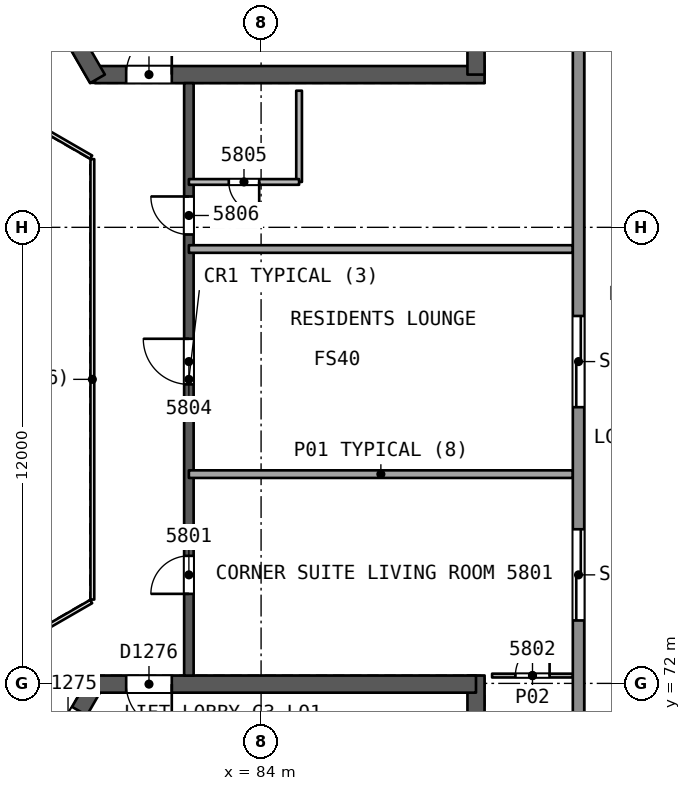
"""IFC4 building model, lengths in metres.
Left out: names, types, materials, properties, quantities, classifications, styles, units other than length and angle.
Written with IfcOpenShell. Run it as: python <this file> out.ifc"""

import sys

from ifc_helpers import new_model, si_unit, direction, frame, frame_2d, origin, place, context, subcontext, project, spatial, rectangle, extrude, element, fill, save


model = new_model("IFC4")
c1 = context("Model", 3, precision=1e-05, world=origin(), true_north=direction((0.0, 1.0)))
c2 = subcontext(c1, "Body", "Model", "MODEL_VIEW")
j1 = project(units=[si_unit("LENGTHUNIT", "METRE"), si_unit("PLANEANGLEUNIT", "RADIAN")], contexts=[c1])
p1 = place(None, origin())
s1 = spatial("IfcSite", under=j1, at=p1, CompositionType="ELEMENT")
p2 = place(p1, origin())
s2 = spatial("IfcBuilding", under=s1, at=p2, CompositionType="ELEMENT")
p3 = place(p2, frame((0.0, 0.0, 235.4)))
s3 = spatial("IfcBuildingStorey", under=s2, at=p3, CompositionType="ELEMENT", Elevation=235.4)
p4 = place(p3, frame((79.63, 88.019, 0.0), z_axis=(0.0, 0.0, 1.0), x_axis=(1.0, 0.0, 0.0)))
e1 = element("IfcWall", 1, at=p4, inside=s3, PredefinedType="SHEAR", context=c2, shape_type="SweptSolid", body=[
    extrude(rectangle(XDim=10.25, YDim=0.45, at=frame_2d((5.125, 0.0))), origin(), (0.0, 0.0, 1.0), 3.7),
])
p5 = place(p4, frame((0.82, 0.0, 0.0)))
e2 = element("IfcOpeningElement", 2, at=p5, cuts=e1, PredefinedType="OPENING", context=c2, shape_type="SweptSolid", body=[
    extrude(rectangle(XDim=1.2, YDim=2.1, at=frame_2d((0.6, 1.05))), frame((0.0, 0.235, 0.0), z_axis=(0.0, -1.0, 0.0), x_axis=(1.0, 0.0, 0.0)), (0.0, 0.0, 1.0), 0.471),
])
p6 = place(p3, frame((89.655, 88.019, 0.0), z_axis=(0.0, 0.0, 1.0), x_axis=(0.0, 1.0, 0.0)))
e3 = element("IfcWall", 3, at=p6, inside=s3, PredefinedType="SHEAR", context=c2, shape_type="SweptSolid", body=[
    extrude(rectangle(XDim=14.108, YDim=0.45, at=frame_2d((7.054, 0.0))), origin(), (0.0, 0.0, 1.0), 3.7),
])
p7 = place(p3, frame((74.617, 96.701, 0.0), z_axis=(0.0, 0.0, 1.0), x_axis=(0.499994385119, -0.866028645513, 0.0)))
e4 = element("IfcWall", 4, at=p7, inside=s3, PredefinedType="SHEAR", context=c2, shape_type="SweptSolid", body=[
    extrude(rectangle(XDim=10.155, YDim=0.45, at=frame_2d((5.077, 0.0))), origin(), (0.0, 0.0, 1.0), 3.7),
])
p8 = place(p7, frame((8.005, 0.0, 0.0)))
e5 = element("IfcOpeningElement", 5, at=p8, cuts=e4, PredefinedType="OPENING", context=c2, shape_type="SweptSolid", body=[
    extrude(rectangle(XDim=1.2, YDim=2.1, at=frame_2d((0.6, 1.05))), frame((0.0, 0.235, 0.0), z_axis=(0.0, -1.0, 0.0), x_axis=(1.0, 0.0, 0.0)), (0.0, 0.0, 1.0), 0.471),
])
p9 = place(p3, frame((79.63, 71.981, 0.0), z_axis=(0.0, 0.0, 1.0), x_axis=(-0.500002171595, -0.86602415001, 0.0)))
e6 = element("IfcWall", 6, at=p9, inside=s3, PredefinedType="SHEAR", context=c2, shape_type="SweptSolid", body=[
    extrude(rectangle(XDim=10.25, YDim=0.45, at=frame_2d((5.125, 0.0))), origin(), (0.0, 0.0, 1.0), 3.7),
])
p10 = place(p9, frame((0.82, 0.0, 0.0)))
e7 = element("IfcOpeningElement", 7, at=p10, cuts=e6, PredefinedType="OPENING", context=c2, shape_type="SweptSolid", body=[
    extrude(rectangle(XDim=1.2, YDim=2.1, at=frame_2d((0.6, 1.05))), frame((0.0, 0.235, 0.0), z_axis=(0.0, -1.0, 0.0), x_axis=(1.0, 0.0, 0.0)), (0.0, 0.0, 1.0), 0.471),
])
p11 = place(p3, frame((89.655, 58.002, 0.0), z_axis=(0.0, 0.0, 1.0), x_axis=(0.0, 1.0, 0.0)))
e8 = element("IfcWall", 8, at=p11, inside=s3, PredefinedType="SHEAR", context=c2, shape_type="SweptSolid", body=[
    extrude(rectangle(XDim=14.204, YDim=0.45, at=frame_2d((7.102, 0.0))), origin(), (0.0, 0.0, 1.0), 3.7),
])
p12 = place(p3, frame((89.655, 71.981, 0.0), z_axis=(0.0, 0.0, 1.0), x_axis=(-1.0, 0.0, 0.0)))
e9 = element("IfcWall", 9, at=p12, inside=s3, PredefinedType="SHEAR", context=c2, shape_type="SweptSolid", body=[
    extrude(rectangle(XDim=10.155, YDim=0.45, at=frame_2d((5.078, 0.0))), origin(), (0.0, 0.0, 1.0), 3.7),
])
p13 = place(p12, frame((8.005, 0.0, 0.0)))
e10 = element("IfcOpeningElement", 10, at=p13, cuts=e9, PredefinedType="OPENING", context=c2, shape_type="SweptSolid", body=[
    extrude(rectangle(XDim=1.2, YDim=2.1, at=frame_2d((0.6, 1.05))), frame((0.0, 0.235, 0.0), z_axis=(0.0, -1.0, 0.0), x_axis=(1.0, 0.0, 0.0)), (0.0, 0.0, 1.0), 0.471),
])
p14 = place(p3, frame((82.1, 72.206, 0.0), z_axis=(0.0, 0.0, 1.0), x_axis=(0.0, 1.0, 0.0)))
e11 = element("IfcWall", 11, at=p14, inside=s3, PredefinedType="SHEAR", context=c2, shape_type="SweptSolid", body=[
    extrude(rectangle(XDim=15.588, YDim=0.25, at=frame_2d((7.794, 0.0))), origin(), (0.0, 0.0, 1.0), 3.3),
])
p15 = place(p14, frame((2.15, 0.0, 0.0)))
e12 = element("IfcOpeningElement", 12, at=p15, cuts=e11, PredefinedType="OPENING", context=c2, shape_type="SweptSolid", body=[
    extrude(rectangle(XDim=1.0, YDim=2.1, at=frame_2d((0.5, 1.05))), frame((0.0, 0.135, 0.0), z_axis=(0.0, -1.0, 0.0), x_axis=(1.0, 0.0, 0.0)), (0.0, 0.0, 1.0), 0.271),
])
p16 = place(p14, frame((7.662, 0.0, 0.0)))
e13 = element("IfcOpeningElement", 13, at=p16, cuts=e11, PredefinedType="OPENING", context=c2, shape_type="SweptSolid", body=[
    extrude(rectangle(XDim=1.2, YDim=2.4, at=frame_2d((0.6, 1.2))), frame((0.0, 0.135, 0.0), z_axis=(0.0, -1.0, 0.0), x_axis=(1.0, 0.0, 0.0)), (0.0, 0.0, 1.0), 0.271),
])
p17 = place(p14, frame((11.606, 0.0, 0.0)))
e14 = element("IfcOpeningElement", 14, at=p17, cuts=e11, PredefinedType="OPENING", context=c2, shape_type="SweptSolid", body=[
    extrude(rectangle(XDim=1.0, YDim=2.1, at=frame_2d((0.5, 1.05))), frame((0.0, 0.135, 0.0), z_axis=(0.0, -1.0, 0.0), x_axis=(1.0, 0.0, 0.0)), (0.0, 0.0, 1.0), 0.271),
])
p18 = place(p3, frame((90.079, 72.206, 0.0), z_axis=(0.0, 0.0, 1.0), x_axis=(1.0, 0.0, 0.0)))
e15 = element("IfcWall", 15, at=p18, inside=s3, PredefinedType="PARTITIONING", context=c2, shape_type="SweptSolid", body=[
    extrude(rectangle(XDim=2.125, YDim=0.1, at=frame_2d((1.062, 0.0))), origin(), (0.0, 0.0, 1.0), 3.3),
])
p19 = place(p18, frame((0.613, 0.0, 0.0)))
e16 = element("IfcOpeningElement", 16, at=p19, cuts=e15, PredefinedType="OPENING", context=c2, shape_type="SweptSolid", body=[
    extrude(rectangle(XDim=0.9, YDim=2.1, at=frame_2d((0.45, 1.05))), frame((0.0, 0.061, 0.0), z_axis=(0.0, -1.0, 0.0), x_axis=(1.0, 0.0, 0.0)), (0.0, 0.0, 1.0), 0.121),
])
for number, where, z_axis, x_axis in (
    (17, (92.204, 77.506, 0.0), (0.0, 0.0, 1.0), (-1.0, 0.0, 0.0)),
    (18, (92.204, 83.429, 0.0), (0.0, 0.0, 1.0), (-1.0, 0.0, 0.0)),
):
    element("IfcWall", number, at=place(p3, frame(where, z_axis=z_axis, x_axis=x_axis)), inside=s3, PredefinedType="PARTITIONING", context=c2, shape_type="SweptSolid", body=[
        extrude(rectangle(XDim=10.104, YDim=0.2, at=frame_2d((5.052, 0.0))), origin(), (0.0, 0.0, 1.0), 3.3),
    ])
p20 = place(p3, frame((85.0, 87.595, 0.0), z_axis=(0.0, 0.0, 1.0), x_axis=(0.0, -1.0, 0.0)))
e19 = element("IfcWall", 19, at=p20, inside=s3, PredefinedType="PARTITIONING", context=c2, shape_type="SweptSolid", body=[
    extrude(rectangle(XDim=2.401, YDim=0.15, at=frame_2d((1.2, 0.0))), origin(), (0.0, 0.0, 1.0), 3.3),
])
p21 = place(p3, frame((85.0, 85.194, 0.0), z_axis=(0.0, 0.0, 1.0), x_axis=(-1.0, 0.0, 0.0)))
e20 = element("IfcWall", 20, at=p21, inside=s3, PredefinedType="PARTITIONING", context=c2, shape_type="SweptSolid", body=[
    extrude(rectangle(XDim=2.9, YDim=0.15, at=frame_2d((1.45, 0.0))), origin(), (0.0, 0.0, 1.0), 3.3),
])
p22 = place(p21, frame((1.05, 0.0, 0.0)))
e21 = element("IfcOpeningElement", 21, at=p22, cuts=e20, PredefinedType="OPENING", context=c2, shape_type="SweptSolid", body=[
    extrude(rectangle(XDim=0.8, YDim=2.1, at=frame_2d((0.4, 1.05))), frame((0.0, 0.085, 0.0), z_axis=(0.0, -1.0, 0.0), x_axis=(1.0, 0.0, 0.0)), (0.0, 0.0, 1.0), 0.171),
])
p23 = place(p3, frame((92.353, 104.952, 0.0), z_axis=(0.0, 0.0, 1.0), x_axis=(0.0, -1.0, 0.0)))
e22 = element("IfcWall", 22, at=p23, inside=s3, PredefinedType="SOLIDWALL", context=c2, shape_type="SweptSolid", body=[
    extrude(rectangle(XDim=49.903, YDim=0.3, at=frame_2d((24.952, 0.0))), origin(), (0.0, 0.0, 1.0), 3.3),
])
p24 = place(p23, frame((28.896, 0.0, 0.0)))
e23 = element("IfcOpeningElement", 23, at=p24, cuts=e22, PredefinedType="OPENING", context=c2, shape_type="SweptSolid", body=[
    extrude(rectangle(XDim=2.4, YDim=2.4, at=frame_2d((1.2, 1.2))), frame((0.0, 0.161, 0.0), z_axis=(0.0, -1.0, 0.0), x_axis=(1.0, 0.0, 0.0)), (0.0, 0.0, 1.0), 0.321),
])
p25 = place(p23, frame((38.836, 0.0, 0.0)))
e24 = element("IfcOpeningElement", 24, at=p25, cuts=e22, PredefinedType="OPENING", context=c2, shape_type="SweptSolid", body=[
    extrude(rectangle(XDim=2.4, YDim=2.4, at=frame_2d((1.2, 1.2))), frame((0.0, 0.161, 0.0), z_axis=(0.0, -1.0, 0.0), x_axis=(1.0, 0.0, 0.0)), (0.0, 0.0, 1.0), 0.321),
])
p26 = place(p23, frame((9.518, 0.0, 0.0)))
e25 = element("IfcOpeningElement", 25, at=p26, cuts=e22, PredefinedType="OPENING", context=c2, shape_type="SweptSolid", body=[
    extrude(rectangle(XDim=2.4, YDim=2.4, at=frame_2d((1.2, 1.2))), frame((0.0, 0.161, 0.0), z_axis=(0.0, -1.0, 0.0), x_axis=(1.0, 0.0, 0.0)), (0.0, 0.0, 1.0), 0.321),
])
p27 = place(p23, frame((23.284, 0.0, 0.0)))
e26 = element("IfcOpeningElement", 26, at=p27, cuts=e22, PredefinedType="OPENING", context=c2, shape_type="SweptSolid", body=[
    extrude(rectangle(XDim=2.4, YDim=2.4, at=frame_2d((1.2, 1.2))), frame((0.0, 0.161, 0.0), z_axis=(0.0, -1.0, 0.0), x_axis=(1.0, 0.0, 0.0)), (0.0, 0.0, 1.0), 0.321),
])
p28 = place(p3, frame((44.715, 82.552, 0.0), z_axis=(0.0, 0.0, 1.0), x_axis=(0.866025334516, 0.500000119977, 0.0)))
e27 = element("IfcWall", 27, at=p28, inside=s3, PredefinedType="SOLIDWALL", context=c2, shape_type="SweptSolid", body=[
    extrude(rectangle(XDim=49.903, YDim=0.3, at=frame_2d((24.952, 0.0))), origin(), (0.0, 0.0, 1.0), 3.3),
])
p29 = place(p28, frame((23.284, 0.0, 0.0)))
e28 = element("IfcOpeningElement", 28, at=p29, cuts=e27, PredefinedType="OPENING", context=c2, shape_type="SweptSolid", body=[
    extrude(rectangle(XDim=2.4, YDim=2.4, at=frame_2d((1.2, 1.2))), frame((0.0, 0.161, 0.0), z_axis=(0.0, -1.0, 0.0), x_axis=(1.0, 0.0, 0.0)), (0.0, 0.0, 1.0), 0.321),
])
p30 = place(p28, frame((37.674, 0.0, 0.0)))
e29 = element("IfcOpeningElement", 29, at=p30, cuts=e27, PredefinedType="OPENING", context=c2, shape_type="SweptSolid", body=[
    extrude(rectangle(XDim=2.4, YDim=2.4, at=frame_2d((1.2, 1.2))), frame((0.0, 0.161, 0.0), z_axis=(0.0, -1.0, 0.0), x_axis=(1.0, 0.0, 0.0)), (0.0, 0.0, 1.0), 0.321),
])
p31 = place(p28, frame((9.362, 0.0, 0.0)))
e30 = element("IfcOpeningElement", 30, at=p31, cuts=e27, PredefinedType="OPENING", context=c2, shape_type="SweptSolid", body=[
    extrude(rectangle(XDim=2.4, YDim=2.4, at=frame_2d((1.2, 1.2))), frame((0.0, 0.161, 0.0), z_axis=(0.0, -1.0, 0.0), x_axis=(1.0, 0.0, 0.0)), (0.0, 0.0, 1.0), 0.321),
])
p32 = place(p3, frame((87.932, 52.496, 0.0), z_axis=(0.0, 0.0, 1.0), x_axis=(-0.866025334516, 0.500000119977, 0.0)))
e31 = element("IfcWall", 31, at=p32, inside=s3, PredefinedType="SOLIDWALL", context=c2, shape_type="SweptSolid", body=[
    extrude(rectangle(XDim=49.903, YDim=0.3, at=frame_2d((24.952, 0.0))), origin(), (0.0, 0.0, 1.0), 3.3),
])
p33 = place(p32, frame((23.907, 0.0, 0.0)))
e32 = element("IfcOpeningElement", 32, at=p33, cuts=e31, PredefinedType="OPENING", context=c2, shape_type="SweptSolid", body=[
    extrude(rectangle(XDim=2.4, YDim=2.4, at=frame_2d((1.2, 1.2))), frame((0.0, 0.161, 0.0), z_axis=(0.0, -1.0, 0.0), x_axis=(1.0, 0.0, 0.0)), (0.0, 0.0, 1.0), 0.321),
])
p34 = place(p32, frame((37.985, 0.0, 0.0)))
e33 = element("IfcOpeningElement", 33, at=p34, cuts=e31, PredefinedType="OPENING", context=c2, shape_type="SweptSolid", body=[
    extrude(rectangle(XDim=2.4, YDim=2.4, at=frame_2d((1.2, 1.2))), frame((0.0, 0.161, 0.0), z_axis=(0.0, -1.0, 0.0), x_axis=(1.0, 0.0, 0.0)), (0.0, 0.0, 1.0), 0.321),
])
p35 = place(p32, frame((9.674, 0.0, 0.0)))
e34 = element("IfcOpeningElement", 34, at=p35, cuts=e31, PredefinedType="OPENING", context=c2, shape_type="SweptSolid", body=[
    extrude(rectangle(XDim=2.4, YDim=2.4, at=frame_2d((1.2, 1.2))), frame((0.0, 0.161, 0.0), z_axis=(0.0, -1.0, 0.0), x_axis=(1.0, 0.0, 0.0)), (0.0, 0.0, 1.0), 0.321),
])
p36 = place(p3, frame((79.56, 74.206, 0.0), z_axis=(0.0, 0.0, 1.0), x_axis=(0.0, 1.0, 0.0)))
e35 = element("IfcWall", 35, at=p36, inside=s3, PredefinedType="PARTITIONING", context=c2, shape_type="SweptSolid", body=[
    extrude(rectangle(XDim=11.588, YDim=0.1, at=frame_2d((5.794, 0.0))), origin(), (0.0, 0.0, 1.0), 3.3),
])
for number, where, z_axis, x_axis in (
    (36, (79.53, 85.846, 0.0), (0.0, 0.0, 1.0), (-0.866, 0.5, 0.0)),
    (37, (77.798, 73.154, 0.0), (0.0, 0.0, 1.0), (0.866, 0.5, 0.0)),
):
    element("IfcWall", number, at=place(p3, frame(where, z_axis=z_axis, x_axis=x_axis)), inside=s3, PredefinedType="PARTITIONING", context=c2, shape_type="SweptSolid", body=[
        extrude(rectangle(XDim=2.0, YDim=0.1, at=frame_2d((1.0, 0.0))), origin(), (0.0, 0.0, 1.0), 3.3),
    ])
p37 = place(p15, origin())
e38 = element("IfcDoor", 38, at=p37, inside=s3, OperationType="SINGLE_SWING_LEFT", PredefinedType="NOTDEFINED", context=c2, shape_type="SweptSolid", body=[
    extrude(rectangle(XDim=1.0, YDim=2.1, at=frame_2d((0.5, 1.05))), frame((0.0, 0.025, 0.0), z_axis=(0.0, -1.0, 0.0), x_axis=(1.0, 0.0, 0.0)), (0.0, 0.0, 1.0), 0.05),
])
fill(e12, e38)
p38 = place(p19, origin())
e39 = element("IfcDoor", 39, at=p38, inside=s3, OperationType="SINGLE_SWING_RIGHT", PredefinedType="NOTDEFINED", context=c2, shape_type="SweptSolid", body=[
    extrude(rectangle(XDim=0.9, YDim=2.1, at=frame_2d((0.45, 1.05))), frame((0.0, 0.025, 0.0), z_axis=(0.0, -1.0, 0.0), x_axis=(1.0, 0.0, 0.0)), (0.0, 0.0, 1.0), 0.05),
])
fill(e16, e39)
p39 = place(p16, origin())
e40 = element("IfcDoor", 40, at=p39, inside=s3, OperationType="SINGLE_SWING_RIGHT", PredefinedType="NOTDEFINED", context=c2, shape_type="SweptSolid", body=[
    extrude(rectangle(XDim=1.2, YDim=2.4, at=frame_2d((0.6, 1.2))), frame((0.0, 0.025, 0.0), z_axis=(0.0, -1.0, 0.0), x_axis=(1.0, 0.0, 0.0)), (0.0, 0.0, 1.0), 0.05),
])
fill(e13, e40)
p40 = place(p22, origin())
e41 = element("IfcDoor", 41, at=p40, inside=s3, OperationType="SINGLE_SWING_LEFT", PredefinedType="NOTDEFINED", context=c2, shape_type="SweptSolid", body=[
    extrude(rectangle(XDim=0.8, YDim=2.1, at=frame_2d((0.4, 1.05))), frame((0.0, 0.025, 0.0), z_axis=(0.0, -1.0, 0.0), x_axis=(1.0, 0.0, 0.0)), (0.0, 0.0, 1.0), 0.05),
])
fill(e21, e41)
p41 = place(p17, origin())
e42 = element("IfcDoor", 42, at=p41, inside=s3, OperationType="SINGLE_SWING_RIGHT", PredefinedType="NOTDEFINED", context=c2, shape_type="SweptSolid", body=[
    extrude(rectangle(XDim=1.0, YDim=2.1, at=frame_2d((0.5, 1.05))), frame((0.0, 0.025, 0.0), z_axis=(0.0, -1.0, 0.0), x_axis=(1.0, 0.0, 0.0)), (0.0, 0.0, 1.0), 0.05),
])
fill(e14, e42)
p42 = place(p24, origin())
e43 = element("IfcDoor", 43, at=p42, inside=s3, OperationType="SLIDING_TO_LEFT", PredefinedType="NOTDEFINED", context=c2, shape_type="SweptSolid", body=[
    extrude(rectangle(XDim=2.4, YDim=2.4, at=frame_2d((1.2, 1.2))), frame((0.0, 0.025, 0.0), z_axis=(0.0, -1.0, 0.0), x_axis=(1.0, 0.0, 0.0)), (0.0, 0.0, 1.0), 0.05),
])
fill(e23, e43)
p43 = place(p27, origin())
e44 = element("IfcDoor", 44, at=p43, inside=s3, OperationType="SLIDING_TO_RIGHT", PredefinedType="NOTDEFINED", context=c2, shape_type="SweptSolid", body=[
    extrude(rectangle(XDim=2.4, YDim=2.4, at=frame_2d((1.2, 1.2))), frame((0.0, 0.025, 0.0), z_axis=(0.0, -1.0, 0.0), x_axis=(1.0, 0.0, 0.0)), (0.0, 0.0, 1.0), 0.05),
])
fill(e26, e44)
p44 = place(p5, origin())
e45 = element("IfcDoor", 45, at=p44, inside=s3, OperationType="SINGLE_SWING_RIGHT", PredefinedType="NOTDEFINED", context=c2, shape_type="SweptSolid", body=[
    extrude(rectangle(XDim=1.2, YDim=2.1, at=frame_2d((0.6, 1.05))), frame((0.0, 0.025, 0.0), z_axis=(0.0, -1.0, 0.0), x_axis=(1.0, 0.0, 0.0)), (0.0, 0.0, 1.0), 0.05),
])
fill(e2, e45)
p45 = place(p10, origin())
e46 = element("IfcDoor", 46, at=p45, inside=s3, OperationType="SINGLE_SWING_RIGHT", PredefinedType="NOTDEFINED", context=c2, shape_type="SweptSolid", body=[
    extrude(rectangle(XDim=1.2, YDim=2.1, at=frame_2d((0.6, 1.05))), frame((0.0, 0.025, 0.0), z_axis=(0.0, -1.0, 0.0), x_axis=(1.0, 0.0, 0.0)), (0.0, 0.0, 1.0), 0.05),
])
fill(e7, e46)
p46 = place(p13, origin())
e47 = element("IfcDoor", 47, at=p46, inside=s3, OperationType="SINGLE_SWING_LEFT", PredefinedType="NOTDEFINED", context=c2, shape_type="SweptSolid", body=[
    extrude(rectangle(XDim=1.2, YDim=2.1, at=frame_2d((0.6, 1.05))), frame((0.0, 0.025, 0.0), z_axis=(0.0, -1.0, 0.0), x_axis=(1.0, 0.0, 0.0)), (0.0, 0.0, 1.0), 0.05),
])
fill(e10, e47)
save(model, sys.argv[1])
